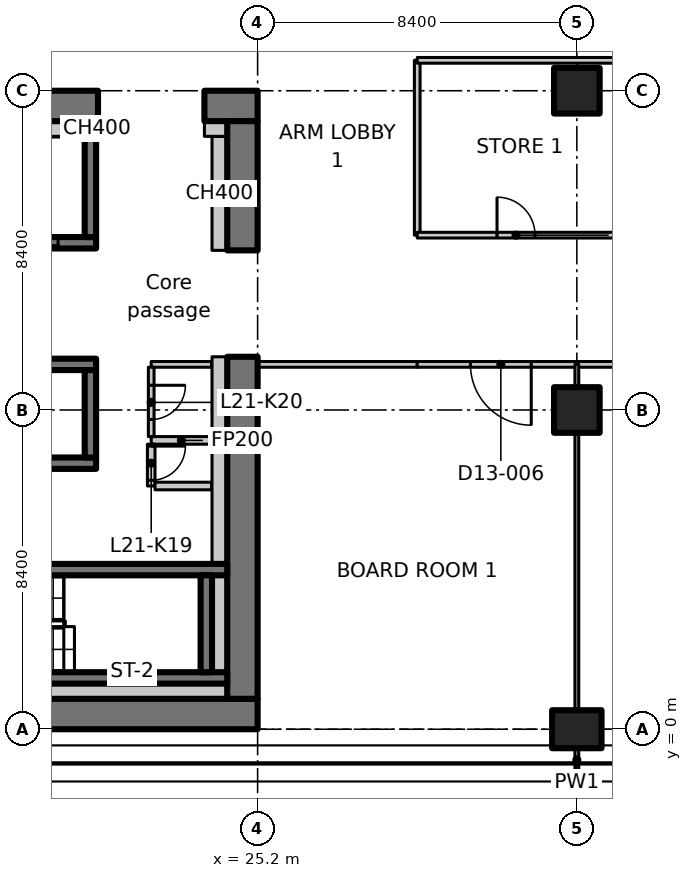
"""IFC4 building model, lengths in metres.
Left out: names, types, materials, properties, quantities, classifications, styles, units other than length and angle.
Written with IfcOpenShell. Run it as: python <this file> out.ifc"""

import sys

from ifc_helpers import new_model, si_unit, direction, frame, frame_2d, origin, origin_2d, place, context, subcontext, project, spatial, rectangle, extrude, element, fill, save


model = new_model("IFC4")
c1 = context("Model", 3, precision=1e-05, world=origin(), true_north=direction((0.0, 1.0)))
c2 = subcontext(c1, "Body", "Model", "MODEL_VIEW")
j1 = project(units=[si_unit("LENGTHUNIT", "METRE"), si_unit("PLANEANGLEUNIT", "RADIAN")], contexts=[c1])
p1 = place(None, origin())
s1 = spatial("IfcSite", under=j1, at=p1, CompositionType="ELEMENT")
p2 = place(p1, origin())
s2 = spatial("IfcBuilding", under=s1, at=p2, CompositionType="ELEMENT")
p3 = place(p2, frame((0.0, 0.0, 91.7)))
s3 = spatial("IfcBuildingStorey", under=s2, at=p3, CompositionType="ELEMENT", Elevation=91.7)
p4 = place(p3, frame((33.6, 0.0, 0.0), z_axis=(0.0, 0.0, 1.0), x_axis=(0.0, 1.0, 0.0)))
e1 = element("IfcColumn", 1, at=p4, inside=s3, PredefinedType="COLUMN", context=c2, shape_type="SweptSolid", body=[
    extrude(rectangle(XDim=1.0, YDim=1.3, at=origin_2d()), origin(), (0.0, 0.0, 1.0), 3.35),
])
for number, where, z_axis, x_axis in (
    (2, (33.6, 8.4, 0.0), (0.0, 0.0, 1.0), (1.0, 0.0, 0.0)),
    (3, (33.6, 16.8, 0.0), (0.0, 0.0, 1.0), (1.0, 0.0, 0.0)),
):
    element("IfcColumn", number, at=place(p3, frame(where, z_axis=z_axis, x_axis=x_axis)), inside=s3, PredefinedType="COLUMN", context=c2, shape_type="SweptSolid", body=[
        extrude(rectangle(XDim=1.2, YDim=1.2, at=origin_2d()), origin(), (0.0, 0.0, 1.0), 3.35),
    ])
p5 = place(p3, frame((7.136, 0.4, 0.0), z_axis=(0.0, 0.0, 1.0), x_axis=(1.0, 0.0, 0.0)))
e4 = element("IfcWall", 4, at=p5, inside=s3, PredefinedType="SHEAR", context=c2, shape_type="SweptSolid", body=[
    extrude(rectangle(XDim=18.063, YDim=0.8, at=frame_2d((9.032, 0.0))), origin(), (0.0, 0.0, 1.0), 3.35),
])
p6 = place(p3, frame((-1.1, 16.4, 0.0), z_axis=(0.0, 0.0, 1.0), x_axis=(1.0, 0.0, 0.0)))
e5 = element("IfcWall", 5, at=p6, inside=s3, PredefinedType="SHEAR", context=c2, shape_type="SweptSolid", body=[
    extrude(rectangle(XDim=22.1, YDim=0.8, at=frame_2d((11.05, 0.0))), origin(), (0.0, 0.0, 1.0), 3.35),
])
p7 = place(p6, frame((3.15, 0.0, 0.0)))
e6 = element("IfcOpeningElement", 6, at=p7, cuts=e5, PredefinedType="OPENING", context=c2, shape_type="SweptSolid", body=[
    extrude(rectangle(XDim=1.1, YDim=2.3, at=frame_2d((0.55, 1.15))), frame((0.0, 0.41, 0.0), z_axis=(0.0, -1.0, 0.0), x_axis=(1.0, 0.0, 0.0)), (0.0, 0.0, 1.0), 0.82),
])
p8 = place(p3, frame((23.8, 16.4, 0.0), z_axis=(0.0, 0.0, 1.0), x_axis=(1.0, 0.0, 0.0)))
e7 = element("IfcWall", 7, at=p8, inside=s3, PredefinedType="SHEAR", context=c2, shape_type="SweptSolid", body=[
    extrude(rectangle(XDim=1.4, YDim=0.8, at=frame_2d((0.7, 0.0))), origin(), (0.0, 0.0, 1.0), 3.35),
])
p9 = place(p3, frame((24.8, 0.8, 0.0), z_axis=(0.0, 0.0, 1.0), x_axis=(0.0, 1.0, 0.0)))
e8 = element("IfcWall", 8, at=p9, inside=s3, PredefinedType="SHEAR", context=c2, shape_type="SweptSolid", body=[
    extrude(rectangle(XDim=9.0, YDim=0.8, at=frame_2d((4.5, 0.0))), origin(), (0.0, 0.0, 1.0), 3.35),
])
p10 = place(p3, frame((24.8, 12.6, 0.0), z_axis=(0.0, 0.0, 1.0), x_axis=(0.0, 1.0, 0.0)))
e9 = element("IfcWall", 9, at=p10, inside=s3, PredefinedType="SHEAR", context=c2, shape_type="SweptSolid", body=[
    extrude(rectangle(XDim=3.4, YDim=0.8, at=frame_2d((1.7, 0.0))), origin(), (0.0, 0.0, 1.0), 3.35),
])
p11 = place(p3, frame((24.2, 12.6, 0.0), z_axis=(0.0, 0.0, 1.0), x_axis=(0.0, 1.0, 0.0)))
e10 = element("IfcWall", 10, at=p11, inside=s3, PredefinedType="PARTITIONING", context=c2, shape_type="SweptSolid", body=[
    extrude(rectangle(XDim=3.0, YDim=0.4, at=frame_2d((1.5, 0.0))), origin(), (0.0, 0.0, 1.0), 3.35),
])
p12 = place(p3, frame((23.8, 15.8, 0.0), z_axis=(0.0, 0.0, 1.0), x_axis=(1.0, 0.0, 0.0)))
e11 = element("IfcWall", 11, at=p12, inside=s3, PredefinedType="PARTITIONING", context=c2, shape_type="SweptSolid", body=[
    extrude(rectangle(XDim=0.6, YDim=0.4, at=frame_2d((0.3, 0.0))), origin(), (0.0, 0.0, 1.0), 3.35),
])
p13 = place(p3, frame((0.8, 7.0, 0.0), z_axis=(0.0, 0.0, 1.0), x_axis=(1.0, 0.0, 0.0)))
e12 = element("IfcWall", 12, at=p13, inside=s3, PredefinedType="SHEAR", context=c2, shape_type="SweptSolid", body=[
    extrude(rectangle(XDim=20.15, YDim=0.3, at=frame_2d((10.075, 0.0))), origin(), (0.0, 0.0, 1.0), 3.35),
])
p14 = place(p3, frame((0.8, 9.6, 0.0), z_axis=(0.0, 0.0, 1.0), x_axis=(1.0, 0.0, 0.0)))
e13 = element("IfcWall", 13, at=p14, inside=s3, PredefinedType="SHEAR", context=c2, shape_type="SweptSolid", body=[
    extrude(rectangle(XDim=20.15, YDim=0.3, at=frame_2d((10.075, 0.0))), origin(), (0.0, 0.0, 1.0), 3.35),
])
p15 = place(p14, frame((1.25, 0.0, 0.0)))
e14 = element("IfcOpeningElement", 14, at=p15, cuts=e13, PredefinedType="OPENING", context=c2, shape_type="SweptSolid", body=[
    extrude(rectangle(XDim=1.1, YDim=2.3, at=frame_2d((0.55, 1.15))), frame((0.0, 0.16, 0.0), z_axis=(0.0, -1.0, 0.0), x_axis=(1.0, 0.0, 0.0)), (0.0, 0.0, 1.0), 0.32),
])
p16 = place(p14, frame((4.05, 0.0, 0.0)))
e15 = element("IfcOpeningElement", 15, at=p16, cuts=e13, PredefinedType="OPENING", context=c2, shape_type="SweptSolid", body=[
    extrude(rectangle(XDim=1.1, YDim=2.3, at=frame_2d((0.55, 1.15))), frame((0.0, 0.16, 0.0), z_axis=(0.0, -1.0, 0.0), x_axis=(1.0, 0.0, 0.0)), (0.0, 0.0, 1.0), 0.32),
])
p17 = place(p14, frame((6.85, 0.0, 0.0)))
e16 = element("IfcOpeningElement", 16, at=p17, cuts=e13, PredefinedType="OPENING", context=c2, shape_type="SweptSolid", body=[
    extrude(rectangle(XDim=1.1, YDim=2.3, at=frame_2d((0.55, 1.15))), frame((0.0, 0.16, 0.0), z_axis=(0.0, -1.0, 0.0), x_axis=(1.0, 0.0, 0.0)), (0.0, 0.0, 1.0), 0.32),
])
p18 = place(p14, frame((9.65, 0.0, 0.0)))
e17 = element("IfcOpeningElement", 17, at=p18, cuts=e13, PredefinedType="OPENING", context=c2, shape_type="SweptSolid", body=[
    extrude(rectangle(XDim=1.1, YDim=2.3, at=frame_2d((0.55, 1.15))), frame((0.0, 0.16, 0.0), z_axis=(0.0, -1.0, 0.0), x_axis=(1.0, 0.0, 0.0)), (0.0, 0.0, 1.0), 0.32),
])
p19 = place(p14, frame((12.45, 0.0, 0.0)))
e18 = element("IfcOpeningElement", 18, at=p19, cuts=e13, PredefinedType="OPENING", context=c2, shape_type="SweptSolid", body=[
    extrude(rectangle(XDim=1.1, YDim=2.3, at=frame_2d((0.55, 1.15))), frame((0.0, 0.16, 0.0), z_axis=(0.0, -1.0, 0.0), x_axis=(1.0, 0.0, 0.0)), (0.0, 0.0, 1.0), 0.32),
])
p20 = place(p14, frame((15.25, 0.0, 0.0)))
e19 = element("IfcOpeningElement", 19, at=p20, cuts=e13, PredefinedType="OPENING", context=c2, shape_type="SweptSolid", body=[
    extrude(rectangle(XDim=1.1, YDim=2.3, at=frame_2d((0.55, 1.15))), frame((0.0, 0.16, 0.0), z_axis=(0.0, -1.0, 0.0), x_axis=(1.0, 0.0, 0.0)), (0.0, 0.0, 1.0), 0.32),
])
p21 = place(p3, frame((20.8, 7.15, 0.0), z_axis=(0.0, 0.0, 1.0), x_axis=(0.0, 1.0, 0.0)))
e20 = element("IfcWall", 20, at=p21, inside=s3, PredefinedType="SHEAR", context=c2, shape_type="SweptSolid", body=[
    extrude(rectangle(XDim=2.3, YDim=0.3, at=frame_2d((1.15, 0.0))), origin(), (0.0, 0.0, 1.0), 3.35),
])
p22 = place(p3, frame((15.05, 12.8, 0.0), z_axis=(0.0, 0.0, 1.0), x_axis=(1.0, 0.0, 0.0)))
e21 = element("IfcWall", 21, at=p22, inside=s3, PredefinedType="SHEAR", context=c2, shape_type="SweptSolid", body=[
    extrude(rectangle(XDim=5.9, YDim=0.3, at=frame_2d((2.95, 0.0))), origin(), (0.0, 0.0, 1.0), 3.35),
])
p23 = place(p22, frame((3.8, 0.0, 0.0)))
e22 = element("IfcOpeningElement", 22, at=p23, cuts=e21, PredefinedType="OPENING", context=c2, shape_type="SweptSolid", body=[
    extrude(rectangle(XDim=1.1, YDim=2.3, at=frame_2d((0.55, 1.15))), frame((0.0, 0.16, 0.0), z_axis=(0.0, -1.0, 0.0), x_axis=(1.0, 0.0, 0.0)), (0.0, 0.0, 1.0), 0.32),
])
p24 = place(p3, frame((20.8, 12.95, 0.0), z_axis=(0.0, 0.0, 1.0), x_axis=(0.0, 1.0, 0.0)))
e23 = element("IfcWall", 23, at=p24, inside=s3, PredefinedType="SHEAR", context=c2, shape_type="SweptSolid", body=[
    extrude(rectangle(XDim=3.05, YDim=0.3, at=frame_2d((1.525, 0.0))), origin(), (0.0, 0.0, 1.0), 3.35),
])
p25 = place(p3, frame((15.8, 1.35, 0.0), z_axis=(0.0, 0.0, 1.0), x_axis=(1.0, 0.0, 0.0)))
e24 = element("IfcWall", 24, at=p25, inside=s3, PredefinedType="SHEAR", context=c2, shape_type="SweptSolid", body=[
    extrude(rectangle(XDim=8.6, YDim=0.3, at=frame_2d((4.3, 0.0))), origin(), (0.0, 0.0, 1.0), 3.35),
])
p26 = place(p3, frame((15.8, 4.2, 0.0), z_axis=(0.0, 0.0, 1.0), x_axis=(1.0, 0.0, 0.0)))
e25 = element("IfcWall", 25, at=p26, inside=s3, PredefinedType="SHEAR", context=c2, shape_type="SweptSolid", body=[
    extrude(rectangle(XDim=8.6, YDim=0.3, at=frame_2d((4.3, 0.0))), origin(), (0.0, 0.0, 1.0), 3.35),
])
p27 = place(p26, frame((0.4, 0.0, 0.0)))
e26 = element("IfcOpeningElement", 26, at=p27, cuts=e25, PredefinedType="OPENING", context=c2, shape_type="SweptSolid", body=[
    extrude(rectangle(XDim=1.0, YDim=2.1, at=frame_2d((0.5, 1.05))), frame((0.0, 0.16, 0.0), z_axis=(0.0, -1.0, 0.0), x_axis=(1.0, 0.0, 0.0)), (0.0, 0.0, 1.0), 0.32),
])
p28 = place(p3, frame((23.85, 1.5, 0.0), z_axis=(0.0, 0.0, 1.0), x_axis=(0.0, 1.0, 0.0)))
e27 = element("IfcWall", 27, at=p28, inside=s3, PredefinedType="SHEAR", context=c2, shape_type="SweptSolid", body=[
    extrude(rectangle(XDim=2.55, YDim=0.3, at=frame_2d((1.275, 0.0))), origin(), (0.0, 0.0, 1.0), 3.35),
])
p29 = place(p3, frame((23.988, 7.6, 0.0), z_axis=(0.0, 0.0, 1.0), x_axis=(-1.0, 0.0, 0.0)))
e28 = element("IfcWall", 28, at=p29, inside=s3, PredefinedType="PARTITIONING", context=c2, shape_type="SweptSolid", body=[
    extrude(rectangle(XDim=1.588, YDim=0.2, at=frame_2d((0.794, 0.0))), origin(), (0.0, 0.0, 1.0), 3.35),
])
p30 = place(p3, frame((22.4, 7.5, 0.0), z_axis=(0.0, 0.0, 1.0), x_axis=(0.0, -1.0, 0.0)))
e29 = element("IfcWall", 29, at=p30, inside=s3, PredefinedType="PARTITIONING", context=c2, shape_type="SweptSolid", body=[
    extrude(rectangle(XDim=1.1, YDim=0.2, at=frame_2d((0.55, 0.0))), origin(), (0.0, 0.0, 1.0), 3.35),
])
p31 = place(p30, frame((0.05, 0.0, 0.0)))
e30 = element("IfcOpeningElement", 30, at=p31, cuts=e29, PredefinedType="OPENING", context=c2, shape_type="SweptSolid", body=[
    extrude(rectangle(XDim=0.9, YDim=2.1, at=frame_2d((0.45, 1.05))), frame((0.0, 0.11, 0.0), z_axis=(0.0, -1.0, 0.0), x_axis=(1.0, 0.0, 0.0)), (0.0, 0.0, 1.0), 0.22),
])
p32 = place(p3, frame((22.5, 6.4, 0.0), z_axis=(0.0, 0.0, 1.0), x_axis=(1.0, 0.0, 0.0)))
e31 = element("IfcWall", 31, at=p32, inside=s3, PredefinedType="PARTITIONING", context=c2, shape_type="SweptSolid", body=[
    extrude(rectangle(XDim=1.488, YDim=0.2, at=frame_2d((0.744, 0.0))), origin(), (0.0, 0.0, 1.0), 3.35),
])
p33 = place(p3, frame((23.988, 9.6, 0.0), z_axis=(0.0, 0.0, 1.0), x_axis=(-1.0, 0.0, 0.0)))
e32 = element("IfcWall", 32, at=p33, inside=s3, PredefinedType="PARTITIONING", context=c2, shape_type="SweptSolid", body=[
    extrude(rectangle(XDim=1.588, YDim=0.15, at=frame_2d((0.794, 0.0))), origin(), (0.0, 0.0, 1.0), 3.35),
])
p34 = place(p3, frame((22.4, 9.525, 0.0), z_axis=(0.0, 0.0, 1.0), x_axis=(0.0, -1.0, 0.0)))
e33 = element("IfcWall", 33, at=p34, inside=s3, PredefinedType="PARTITIONING", context=c2, shape_type="SweptSolid", body=[
    extrude(rectangle(XDim=1.825, YDim=0.15, at=frame_2d((0.913, 0.0))), origin(), (0.0, 0.0, 1.0), 3.35),
])
p35 = place(p34, frame((0.475, 0.0, 0.0)))
e34 = element("IfcOpeningElement", 34, at=p35, cuts=e33, PredefinedType="OPENING", context=c2, shape_type="SweptSolid", body=[
    extrude(rectangle(XDim=0.9, YDim=2.1, at=frame_2d((0.45, 1.05))), frame((0.0, 0.085, 0.0), z_axis=(0.0, -1.0, 0.0), x_axis=(1.0, 0.0, 0.0)), (0.0, 0.0, 1.0), 0.17),
])
p36 = place(p3, frame((18.15, 15.8, 0.0), z_axis=(0.0, 0.0, 1.0), x_axis=(1.0, 0.0, 0.0)))
e35 = element("IfcWall", 35, at=p36, inside=s3, PredefinedType="PARTITIONING", context=c2, shape_type="SweptSolid", body=[
    extrude(rectangle(XDim=2.5, YDim=0.4, at=frame_2d((1.25, 0.0))), origin(), (0.0, 0.0, 1.0), 3.35),
])
p37 = place(p3, frame((20.95, 15.8, 0.0), z_axis=(0.0, 0.0, 1.0), x_axis=(1.0, 0.0, 0.0)))
e36 = element("IfcWall", 36, at=p37, inside=s3, PredefinedType="PARTITIONING", context=c2, shape_type="SweptSolid", body=[
    extrude(rectangle(XDim=0.05, YDim=0.4, at=frame_2d((0.025, 0.0))), origin(), (0.0, 0.0, 1.0), 3.35),
])
p38 = place(p3, frame((13.35, 1.0, 0.0), z_axis=(0.0, 0.0, 1.0), x_axis=(1.0, 0.0, 0.0)))
e37 = element("IfcWall", 37, at=p38, inside=s3, PredefinedType="PARTITIONING", context=c2, shape_type="SweptSolid", body=[
    extrude(rectangle(XDim=11.05, YDim=0.4, at=frame_2d((5.525, 0.0))), origin(), (0.0, 0.0, 1.0), 3.35),
])
p39 = place(p3, frame((24.2, 1.5, 0.0), z_axis=(0.0, 0.0, 1.0), x_axis=(0.0, 1.0, 0.0)))
e38 = element("IfcWall", 38, at=p39, inside=s3, PredefinedType="PARTITIONING", context=c2, shape_type="SweptSolid", body=[
    extrude(rectangle(XDim=2.55, YDim=0.4, at=frame_2d((1.275, 0.0))), origin(), (0.0, 0.0, 1.0), 3.35),
])
p40 = place(p3, frame((24.2, 4.35, 0.0), z_axis=(0.0, 0.0, 1.0), x_axis=(0.0, 1.0, 0.0)))
e39 = element("IfcWall", 39, at=p40, inside=s3, PredefinedType="PARTITIONING", context=c2, shape_type="SweptSolid", body=[
    extrude(rectangle(XDim=5.45, YDim=0.4, at=frame_2d((2.725, 0.0))), origin(), (0.0, 0.0, 1.0), 3.35),
])
p41 = place(p3, frame((29.4, 17.6, 0.0), z_axis=(0.0, 0.0, 1.0), x_axis=(0.0, -1.0, 0.0)))
e40 = element("IfcWall", 40, at=p41, inside=s3, PredefinedType="PARTITIONING", context=c2, shape_type="SweptSolid", body=[
    extrude(rectangle(XDim=4.6, YDim=0.15, at=frame_2d((2.3, 0.0))), origin(), (0.0, 0.0, 1.0), 3.33),
])
p42 = place(p3, frame((29.4, 9.6, 0.0), z_axis=(0.0, 0.0, 1.0), x_axis=(-1.0, 0.0, 0.0)))
e41 = element("IfcWall", 41, at=p42, inside=s3, PredefinedType="PARTITIONING", context=c2, shape_type="SweptSolid", body=[
    extrude(rectangle(XDim=4.2, YDim=0.15, at=frame_2d((2.1, 0.0))), origin(), (0.0, 0.0, 1.0), 3.33),
])
p43 = place(p3, frame((29.4, 13.0, 0.0), z_axis=(0.0, 0.0, 1.0), x_axis=(1.0, 0.0, 0.0)))
e42 = element("IfcWall", 42, at=p43, inside=s3, PredefinedType="PARTITIONING", context=c2, shape_type="SweptSolid", body=[
    extrude(rectangle(XDim=5.4, YDim=0.15, at=frame_2d((2.7, 0.0))), origin(), (0.0, 0.0, 1.0), 3.33),
])
p44 = place(p43, frame((2.1, 0.0, 0.0)))
e43 = element("IfcOpeningElement", 43, at=p44, cuts=e42, PredefinedType="OPENING", context=c2, shape_type="SweptSolid", body=[
    extrude(rectangle(XDim=1.0, YDim=2.1, at=frame_2d((0.5, 1.05))), frame((0.0, 0.085, 0.0), z_axis=(0.0, -1.0, 0.0), x_axis=(1.0, 0.0, 0.0)), (0.0, 0.0, 1.0), 0.17),
])
p45 = place(p3, frame((33.6, 9.6, 0.0), z_axis=(0.0, 0.0, 1.0), x_axis=(-1.0, 0.0, 0.0)))
e44 = element("IfcWall", 44, at=p45, inside=s3, PredefinedType="PARTITIONING", context=c2, shape_type="SweptSolid", body=[
    extrude(rectangle(XDim=4.2, YDim=0.15, at=frame_2d((2.1, 0.0))), origin(), (0.0, 0.0, 1.0), 3.33),
])
p46 = place(p45, frame((1.2, 0.0, 0.0)))
e45 = element("IfcOpeningElement", 45, at=p46, cuts=e44, PredefinedType="OPENING", context=c2, shape_type="SweptSolid", body=[
    extrude(rectangle(XDim=1.6, YDim=2.1, at=frame_2d((0.8, 1.05))), frame((0.0, 0.085, 0.0), z_axis=(0.0, -1.0, 0.0), x_axis=(1.0, 0.0, 0.0)), (0.0, 0.0, 1.0), 0.17),
])
p47 = place(p3, frame((37.8, 9.6, 0.0), z_axis=(0.0, 0.0, 1.0), x_axis=(-1.0, 0.0, 0.0)))
e46 = element("IfcWall", 46, at=p47, inside=s3, PredefinedType="PARTITIONING", context=c2, shape_type="SweptSolid", body=[
    extrude(rectangle(XDim=4.2, YDim=0.15, at=frame_2d((2.1, 0.0))), origin(), (0.0, 0.0, 1.0), 3.33),
])
p48 = place(p47, frame((1.5, 0.0, 0.0)))
e47 = element("IfcOpeningElement", 47, at=p48, cuts=e46, PredefinedType="OPENING", context=c2, shape_type="SweptSolid", body=[
    extrude(rectangle(XDim=1.1, YDim=2.1, at=frame_2d((0.55, 1.05))), frame((0.0, 0.085, 0.0), z_axis=(0.0, -1.0, 0.0), x_axis=(1.0, 0.0, 0.0)), (0.0, 0.0, 1.0), 0.17),
])
p49 = place(p3, frame((34.8, 17.6, 0.0), z_axis=(0.0, 0.0, 1.0), x_axis=(-1.0, 0.0, 0.0)))
e48 = element("IfcWall", 48, at=p49, inside=s3, PredefinedType="PARTITIONING", context=c2, shape_type="SweptSolid", body=[
    extrude(rectangle(XDim=5.4, YDim=0.15, at=frame_2d((2.7, 0.0))), origin(), (0.0, 0.0, 1.0), 3.33),
])
p50 = place(p3, frame((33.6, 9.6, 0.0), z_axis=(0.0, 0.0, 1.0), x_axis=(0.0, -1.0, 0.0)))
e49 = element("IfcWall", 49, at=p50, inside=s3, PredefinedType="PARTITIONING", context=c2, shape_type="SweptSolid", body=[
    extrude(rectangle(XDim=0.58, YDim=0.1, at=frame_2d((0.29, 0.0))), origin(), (0.0, 0.0, 1.0), 3.33),
])
p51 = place(p3, frame((33.6, 7.78, 0.0), z_axis=(0.0, 0.0, 1.0), x_axis=(0.0, -1.0, 0.0)))
e50 = element("IfcWall", 50, at=p51, inside=s3, PredefinedType="PARTITIONING", context=c2, shape_type="SweptSolid", body=[
    extrude(rectangle(XDim=7.26, YDim=0.1, at=frame_2d((3.63, 0.0))), origin(), (0.0, 0.0, 1.0), 3.33),
])
p52 = place(p3, frame((33.6, -0.52, 0.0), z_axis=(0.0, 0.0, 1.0), x_axis=(0.0, -1.0, 0.0)))
e51 = element("IfcWall", 51, at=p52, inside=s3, PredefinedType="PARTITIONING", context=c2, shape_type="SweptSolid", body=[
    extrude(rectangle(XDim=0.58, YDim=0.1, at=frame_2d((0.29, 0.0))), origin(), (0.0, 0.0, 1.0), 3.33),
])
p53 = place(p23, origin())
e52 = element("IfcDoor", 52, at=p53, inside=s3, OperationType="SLIDING_TO_LEFT", PredefinedType="DOOR", context=c2, shape_type="SweptSolid", body=[
    extrude(rectangle(XDim=1.1, YDim=2.3, at=frame_2d((0.55, 1.15))), frame((0.0, 0.025, 0.0), z_axis=(0.0, -1.0, 0.0), x_axis=(1.0, 0.0, 0.0)), (0.0, 0.0, 1.0), 0.05),
])
fill(e22, e52)
p54 = place(p31, origin())
e53 = element("IfcDoor", 53, at=p54, inside=s3, OperationType="SINGLE_SWING_LEFT", PredefinedType="DOOR", context=c2, shape_type="SweptSolid", body=[
    extrude(rectangle(XDim=0.9, YDim=2.1, at=frame_2d((0.45, 1.05))), frame((0.0, 0.025, 0.0), z_axis=(0.0, -1.0, 0.0), x_axis=(1.0, 0.0, 0.0)), (0.0, 0.0, 1.0), 0.05),
])
fill(e30, e53)
p55 = place(p35, origin())
e54 = element("IfcDoor", 54, at=p55, inside=s3, OperationType="SINGLE_SWING_RIGHT", PredefinedType="DOOR", context=c2, shape_type="SweptSolid", body=[
    extrude(rectangle(XDim=0.9, YDim=2.1, at=frame_2d((0.45, 1.05))), frame((0.0, 0.025, 0.0), z_axis=(0.0, -1.0, 0.0), x_axis=(1.0, 0.0, 0.0)), (0.0, 0.0, 1.0), 0.05),
])
fill(e34, e54)
p56 = place(p44, origin())
e55 = element("IfcDoor", 55, at=p56, inside=s3, OperationType="SINGLE_SWING_LEFT", PredefinedType="DOOR", context=c2, shape_type="SweptSolid", body=[
    extrude(rectangle(XDim=1.0, YDim=2.1, at=frame_2d((0.5, 1.05))), frame((0.0, 0.025, 0.0), z_axis=(0.0, -1.0, 0.0), x_axis=(1.0, 0.0, 0.0)), (0.0, 0.0, 1.0), 0.05),
])
fill(e43, e55)
p57 = place(p46, origin())
e56 = element("IfcDoor", 56, at=p57, inside=s3, OperationType="DOUBLE_DOOR_SINGLE_SWING", PredefinedType="DOOR", context=c2, shape_type="SweptSolid", body=[
    extrude(rectangle(XDim=1.6, YDim=2.1, at=frame_2d((0.8, 1.05))), frame((0.0, 0.025, 0.0), z_axis=(0.0, -1.0, 0.0), x_axis=(1.0, 0.0, 0.0)), (0.0, 0.0, 1.0), 0.05),
])
fill(e45, e56)
save(model, sys.argv[1])
